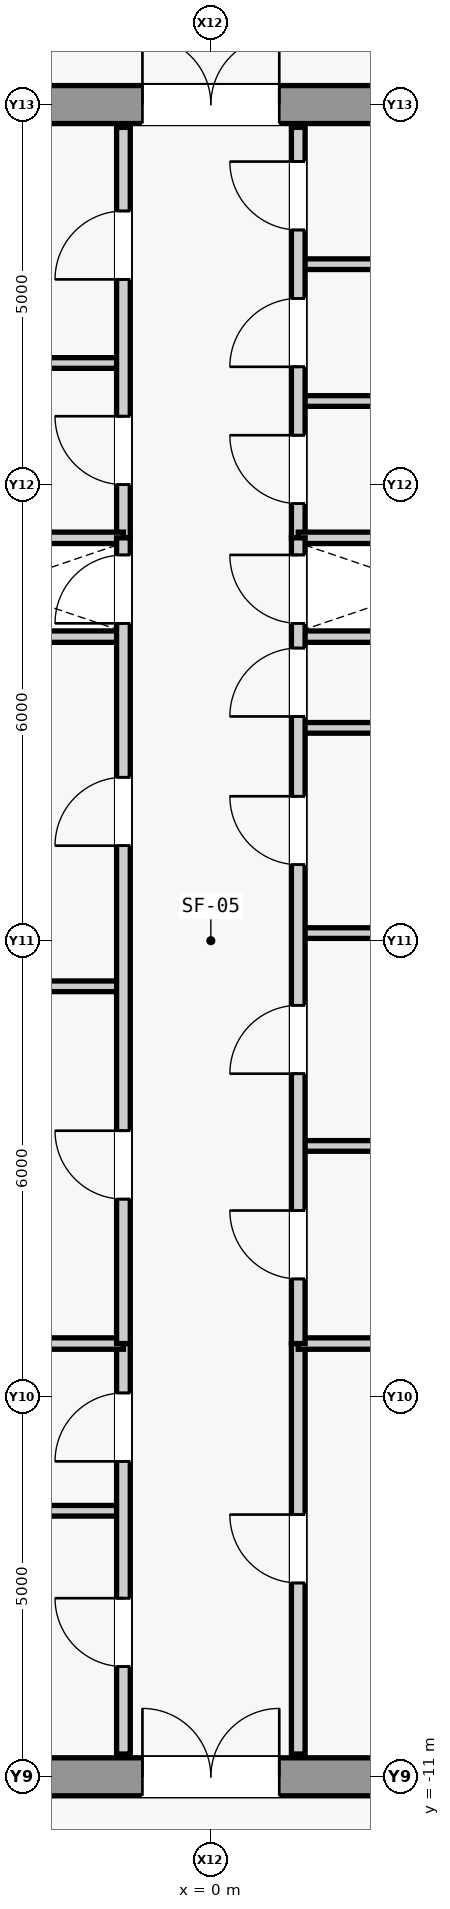
"""IFC4 building model, lengths in metres.
Left out: names, types, materials, properties, quantities, classifications, styles, units other than length and angle.
Written with IfcOpenShell. Run it as: python <this file> out.ifc"""

import sys

from ifc_helpers import new_model, si_unit, direction, frame, frame_2d, origin, place, context, subcontext, project, spatial, rectangle, extrude, source, transform, mapped, element, fill, save


model = new_model("IFC4")
c1 = context("Model", 3, precision=1e-05, world=origin(), true_north=direction((0.0, 1.0)))
c2 = subcontext(c1, "Body", "Model", "MODEL_VIEW")
j1 = project(units=[si_unit("LENGTHUNIT", "METRE"), si_unit("PLANEANGLEUNIT", "RADIAN")], contexts=[c1])
p1 = place(None, origin())
s1 = spatial("IfcSite", under=j1, at=p1, CompositionType="ELEMENT")
p2 = place(p1, origin())
s2 = spatial("IfcBuilding", under=s1, at=p2, CompositionType="ELEMENT")
p3 = place(p2, frame((0.0, 0.0, 399.5)))
s3 = spatial("IfcBuildingStorey", under=s2, at=p3, CompositionType="ELEMENT", Elevation=399.5)
m1 = source(origin(), c2, "Body", "SweptSolid", [
    extrude(rectangle(XDim=9.2, YDim=0.5, at=frame_2d((4.6, 0.0))), origin(), (0.0, 0.0, 1.0), 4.5),
])
p4 = place(p3, frame((-4.6, -11.0, 0.0), z_axis=(0.0, 0.0, 1.0), x_axis=(1.0, 0.0, 0.0)))
e1 = element("IfcWall", 1, at=p4, inside=s3, PredefinedType="SHEAR", context=c2, shape_type="MappedRepresentation", body=[
    mapped(m1, transform((0.0, 0.0, 0.0), scale=1.0)),
])
m2 = source(origin(), c2, "Body", "SweptSolid", [
    extrude(rectangle(XDim=1.8, YDim=2.25, at=frame_2d((0.9, 1.125))), frame((0.0, 0.26, 0.0), z_axis=(0.0, -1.0, 0.0), x_axis=(1.0, 0.0, 0.0)), (0.0, 0.0, 1.0), 0.52),
])
p5 = place(p4, frame((3.7, 0.0, 0.0)))
e2 = element("IfcOpeningElement", 2, at=p5, cuts=e1, PredefinedType="OPENING", context=c2, shape_type="MappedRepresentation", body=[
    mapped(m2, transform((0.0, 0.0, 0.0), scale=1.0)),
])
p6 = place(p3, frame((-4.6, 11.0, 0.0), z_axis=(0.0, 0.0, 1.0), x_axis=(1.0, 0.0, 0.0)))
e3 = element("IfcWall", 3, at=p6, inside=s3, PredefinedType="SHEAR", context=c2, shape_type="MappedRepresentation", body=[
    mapped(m1, transform((0.0, 0.0, 0.0), scale=1.0)),
])
p7 = place(p6, frame((3.7, 0.0, 0.0)))
e4 = element("IfcOpeningElement", 4, at=p7, cuts=e3, PredefinedType="OPENING", context=c2, shape_type="MappedRepresentation", body=[
    mapped(m2, transform((0.0, 0.0, 0.0), scale=1.0)),
])
m3 = source(origin(), c2, "Body", "SweptSolid", [
    extrude(rectangle(XDim=3.45, YDim=0.15, at=frame_2d((1.725, 0.0))), origin(), (0.0, 0.0, 1.0), 4.5),
])
for number, where, z_axis, x_axis in (
    (5, (-4.6, 4.0, 0.0), (0.0, 0.0, 1.0), (1.0, 0.0, 0.0)),
    (6, (1.15, 4.0, 0.0), (0.0, 0.0, 1.0), (1.0, 0.0, 0.0)),
):
    element("IfcWall", number, at=place(p3, frame(where, z_axis=z_axis, x_axis=x_axis)), inside=s3, PredefinedType="PARTITIONING", context=c2, shape_type="MappedRepresentation", body=[
        mapped(m3, transform((0.0, 0.0, 0.0), scale=1.0)),
    ])
m4 = source(origin(), c2, "Body", "SweptSolid", [
    extrude(rectangle(XDim=3.45, YDim=0.14, at=frame_2d((1.725, 0.0))), origin(), (0.0, 0.0, 1.0), 4.5),
])
p8 = place(p3, frame((-4.6, -7.5, 0.0), z_axis=(0.0, 0.0, 1.0), x_axis=(1.0, 0.0, 0.0)))
e7 = element("IfcWall", 7, at=p8, inside=s3, PredefinedType="PARTITIONING", context=c2, shape_type="MappedRepresentation", body=[
    mapped(m4, transform((0.0, 0.0, 0.0), scale=1.0)),
])
m5 = source(origin(), c2, "Body", "SweptSolid", [
    extrude(rectangle(XDim=5.4, YDim=0.18, at=frame_2d((2.7, 0.0))), origin(), (0.0, 0.0, 1.0), 4.5),
])
p9 = place(p3, frame((-1.15, -10.7, 0.0), z_axis=(0.0, 0.0, 1.0), x_axis=(0.0, 1.0, 0.0)))
e8 = element("IfcWall", 8, at=p9, inside=s3, PredefinedType="PARTITIONING", context=c2, shape_type="MappedRepresentation", body=[
    mapped(m5, transform((0.0, 0.0, 0.0), scale=1.0)),
])
m6 = source(origin(), c2, "Body", "SweptSolid", [
    extrude(rectangle(XDim=0.9, YDim=2.15, at=frame_2d((0.45, 1.075))), frame((0.0, 0.1, 0.0), z_axis=(0.0, -1.0, 0.0), x_axis=(1.0, 0.0, 0.0)), (0.0, 0.0, 1.0), 0.2),
])
p10 = place(p9, frame((1.15, 0.0, 0.0)))
e9 = element("IfcOpeningElement", 9, at=p10, cuts=e8, PredefinedType="OPENING", context=c2, shape_type="MappedRepresentation", body=[
    mapped(m6, transform((0.0, 0.0, 0.0), scale=1.0)),
])
p11 = place(p9, frame((3.85, 0.0, 0.0)))
e10 = element("IfcOpeningElement", 10, at=p11, cuts=e8, PredefinedType="OPENING", context=c2, shape_type="MappedRepresentation", body=[
    mapped(m6, transform((0.0, 0.0, 0.0), scale=1.0)),
])
p12 = place(p3, frame((1.15, -10.7, 0.0), z_axis=(0.0, 0.0, 1.0), x_axis=(0.0, 1.0, 0.0)))
e11 = element("IfcWall", 11, at=p12, inside=s3, PredefinedType="PARTITIONING", context=c2, shape_type="MappedRepresentation", body=[
    mapped(m5, transform((0.0, 0.0, 0.0), scale=1.0)),
])
p13 = place(p12, frame((2.25, 0.0, 0.0)))
e12 = element("IfcOpeningElement", 12, at=p13, cuts=e11, PredefinedType="OPENING", context=c2, shape_type="MappedRepresentation", body=[
    mapped(m6, transform((0.0, 0.0, 0.0), scale=1.0)),
])
for number, where, z_axis, x_axis in (
    (13, (-4.6, -5.3, 0.0), (0.0, 0.0, 1.0), (1.0, 0.0, 0.0)),
    (14, (1.15, -5.3, 0.0), (0.0, 0.0, 1.0), (1.0, 0.0, 0.0)),
):
    element("IfcWall", number, at=place(p3, frame(where, z_axis=z_axis, x_axis=x_axis)), inside=s3, PredefinedType="PARTITIONING", context=c2, shape_type="MappedRepresentation", body=[
        mapped(m3, transform((0.0, 0.0, 0.0), scale=1.0)),
    ])
p14 = place(p3, frame((-4.6, 7.6, 0.0), z_axis=(0.0, 0.0, 1.0), x_axis=(1.0, 0.0, 0.0)))
e15 = element("IfcWall", 15, at=p14, inside=s3, PredefinedType="PARTITIONING", context=c2, shape_type="MappedRepresentation", body=[
    mapped(m4, transform((0.0, 0.0, 0.0), scale=1.0)),
])
p15 = place(p3, frame((-1.15, 5.3, 0.0), z_axis=(0.0, 0.0, 1.0), x_axis=(0.0, 1.0, 0.0)))
e16 = element("IfcWall", 16, at=p15, inside=s3, PredefinedType="PARTITIONING", context=c2, shape_type="MappedRepresentation", body=[
    mapped(m5, transform((0.0, 0.0, 0.0), scale=1.0)),
])
p16 = place(p15, frame((0.7, 0.0, 0.0)))
e17 = element("IfcOpeningElement", 17, at=p16, cuts=e16, PredefinedType="OPENING", context=c2, shape_type="MappedRepresentation", body=[
    mapped(m6, transform((0.0, 0.0, 0.0), scale=1.0)),
])
p17 = place(p15, frame((3.4, 0.0, 0.0)))
e18 = element("IfcOpeningElement", 18, at=p17, cuts=e16, PredefinedType="OPENING", context=c2, shape_type="MappedRepresentation", body=[
    mapped(m6, transform((0.0, 0.0, 0.0), scale=1.0)),
])
for number, where, z_axis, x_axis in (
    (19, (1.15, 7.1, 0.0), (0.0, 0.0, 1.0), (1.0, 0.0, 0.0)),
    (20, (1.15, 8.9, 0.0), (0.0, 0.0, 1.0), (1.0, 0.0, 0.0)),
):
    element("IfcWall", number, at=place(p3, frame(where, z_axis=z_axis, x_axis=x_axis)), inside=s3, PredefinedType="PARTITIONING", context=c2, shape_type="MappedRepresentation", body=[
        mapped(m4, transform((0.0, 0.0, 0.0), scale=1.0)),
    ])
p18 = place(p3, frame((1.15, 5.3, 0.0), z_axis=(0.0, 0.0, 1.0), x_axis=(0.0, 1.0, 0.0)))
e21 = element("IfcWall", 21, at=p18, inside=s3, PredefinedType="PARTITIONING", context=c2, shape_type="MappedRepresentation", body=[
    mapped(m5, transform((0.0, 0.0, 0.0), scale=1.0)),
])
p19 = place(p18, frame((0.45, 0.0, 0.0)))
e22 = element("IfcOpeningElement", 22, at=p19, cuts=e21, PredefinedType="OPENING", context=c2, shape_type="MappedRepresentation", body=[
    mapped(m6, transform((0.0, 0.0, 0.0), scale=1.0)),
])
p20 = place(p18, frame((2.25, 0.0, 0.0)))
e23 = element("IfcOpeningElement", 23, at=p20, cuts=e21, PredefinedType="OPENING", context=c2, shape_type="MappedRepresentation", body=[
    mapped(m6, transform((0.0, 0.0, 0.0), scale=1.0)),
])
p21 = place(p18, frame((4.05, 0.0, 0.0)))
e24 = element("IfcOpeningElement", 24, at=p21, cuts=e21, PredefinedType="OPENING", context=c2, shape_type="MappedRepresentation", body=[
    mapped(m6, transform((0.0, 0.0, 0.0), scale=1.0)),
])
for number, where, z_axis, x_axis in (
    (25, (-4.6, 5.3, 0.0), (0.0, 0.0, 1.0), (1.0, 0.0, 0.0)),
    (26, (1.15, 5.3, 0.0), (0.0, 0.0, 1.0), (1.0, 0.0, 0.0)),
):
    element("IfcWall", number, at=place(p3, frame(where, z_axis=z_axis, x_axis=x_axis)), inside=s3, PredefinedType="PARTITIONING", context=c2, shape_type="MappedRepresentation", body=[
        mapped(m3, transform((0.0, 0.0, 0.0), scale=1.0)),
    ])
p22 = place(p3, frame((-4.6, -0.6, 0.0), z_axis=(0.0, 0.0, 1.0), x_axis=(1.0, 0.0, 0.0)))
e27 = element("IfcWall", 27, at=p22, inside=s3, PredefinedType="PARTITIONING", context=c2, shape_type="MappedRepresentation", body=[
    mapped(m4, transform((0.0, 0.0, 0.0), scale=1.0)),
])
m7 = source(origin(), c2, "Body", "SweptSolid", [
    extrude(rectangle(XDim=10.6, YDim=0.18, at=frame_2d((5.3, 0.0))), origin(), (0.0, 0.0, 1.0), 4.5),
])
p23 = place(p3, frame((-1.15, -5.3, 0.0), z_axis=(0.0, 0.0, 1.0), x_axis=(0.0, 1.0, 0.0)))
e28 = element("IfcWall", 28, at=p23, inside=s3, PredefinedType="PARTITIONING", context=c2, shape_type="MappedRepresentation", body=[
    mapped(m7, transform((0.0, 0.0, 0.0), scale=1.0)),
])
p24 = place(p23, frame((1.9, 0.0, 0.0)))
e29 = element("IfcOpeningElement", 29, at=p24, cuts=e28, PredefinedType="OPENING", context=c2, shape_type="MappedRepresentation", body=[
    mapped(m6, transform((0.0, 0.0, 0.0), scale=1.0)),
])
p25 = place(p23, frame((6.55, 0.0, 0.0)))
e30 = element("IfcOpeningElement", 30, at=p25, cuts=e28, PredefinedType="OPENING", context=c2, shape_type="MappedRepresentation", body=[
    mapped(m6, transform((0.0, 0.0, 0.0), scale=1.0)),
])
p26 = place(p23, frame((9.475, 0.0, 0.0)))
e31 = element("IfcOpeningElement", 31, at=p26, cuts=e28, PredefinedType="OPENING", context=c2, shape_type="MappedRepresentation", body=[
    mapped(m6, transform((0.0, 0.0, 0.0), scale=1.0)),
])
p27 = place(p3, frame((1.15, -2.7, 0.0), z_axis=(0.0, 0.0, 1.0), x_axis=(1.0, 0.0, 0.0)))
e32 = element("IfcWall", 32, at=p27, inside=s3, PredefinedType="PARTITIONING", context=c2, shape_type="MappedRepresentation", body=[
    mapped(m4, transform((0.0, 0.0, 0.0), scale=1.0)),
])
m8 = source(origin(), c2, "Body", "SweptSolid", [
    extrude(rectangle(XDim=3.45, YDim=0.14, at=frame_2d((1.725, 0.0))), origin(), (0.0, 0.0, 1.0), 3.805),
])
p28 = place(p3, frame((1.15, 0.1, 0.0), z_axis=(0.0, 0.0, 1.0), x_axis=(1.0, 0.0, 0.0)))
e33 = element("IfcWall", 33, at=p28, inside=s3, PredefinedType="PARTITIONING", context=c2, shape_type="MappedRepresentation", body=[
    mapped(m8, transform((0.0, 0.0, 0.0), scale=1.0)),
])
p29 = place(p3, frame((1.15, 2.8, 0.0), z_axis=(0.0, 0.0, 1.0), x_axis=(1.0, 0.0, 0.0)))
e34 = element("IfcWall", 34, at=p29, inside=s3, PredefinedType="PARTITIONING", context=c2, shape_type="MappedRepresentation", body=[
    mapped(m4, transform((0.0, 0.0, 0.0), scale=1.0)),
])
p30 = place(p3, frame((1.15, -5.3, 0.0), z_axis=(0.0, 0.0, 1.0), x_axis=(0.0, 1.0, 0.0)))
e35 = element("IfcWall", 35, at=p30, inside=s3, PredefinedType="PARTITIONING", context=c2, shape_type="MappedRepresentation", body=[
    mapped(m7, transform((0.0, 0.0, 0.0), scale=1.0)),
])
p31 = place(p30, frame((0.85, 0.0, 0.0)))
e36 = element("IfcOpeningElement", 36, at=p31, cuts=e35, PredefinedType="OPENING", context=c2, shape_type="MappedRepresentation", body=[
    mapped(m6, transform((0.0, 0.0, 0.0), scale=1.0)),
])
p32 = place(p30, frame((3.55, 0.0, 0.0)))
e37 = element("IfcOpeningElement", 37, at=p32, cuts=e35, PredefinedType="OPENING", context=c2, shape_type="MappedRepresentation", body=[
    mapped(m6, transform((0.0, 0.0, 0.0), scale=1.0)),
])
p33 = place(p30, frame((6.3, 0.0, 0.0)))
e38 = element("IfcOpeningElement", 38, at=p33, cuts=e35, PredefinedType="OPENING", context=c2, shape_type="MappedRepresentation", body=[
    mapped(m6, transform((0.0, 0.0, 0.0), scale=1.0)),
])
p34 = place(p30, frame((8.25, 0.0, 0.0)))
e39 = element("IfcOpeningElement", 39, at=p34, cuts=e35, PredefinedType="OPENING", context=c2, shape_type="MappedRepresentation", body=[
    mapped(m6, transform((0.0, 0.0, 0.0), scale=1.0)),
])
p35 = place(p30, frame((9.475, 0.0, 0.0)))
e40 = element("IfcOpeningElement", 40, at=p35, cuts=e35, PredefinedType="OPENING", context=c2, shape_type="MappedRepresentation", body=[
    mapped(m6, transform((0.0, 0.0, 0.0), scale=1.0)),
])
m9 = source(origin(), c2, "Body", "SweptSolid", [
    extrude(rectangle(XDim=0.9, YDim=2.15, at=frame_2d((0.45, 1.075))), frame((0.0, 0.025, 0.0), z_axis=(0.0, -1.0, 0.0), x_axis=(1.0, 0.0, 0.0)), (0.0, 0.0, 1.0), 0.05),
])
p36 = place(p10, origin())
e41 = element("IfcDoor", 41, at=p36, inside=s3, OperationType="SINGLE_SWING_RIGHT", PredefinedType="DOOR", context=c2, shape_type="MappedRepresentation", body=[
    mapped(m9, transform((0.0, 0.0, 0.0), scale=1.0)),
])
fill(e9, e41)
p37 = place(p11, origin())
e42 = element("IfcDoor", 42, at=p37, inside=s3, OperationType="SINGLE_SWING_LEFT", PredefinedType="DOOR", context=c2, shape_type="MappedRepresentation", body=[
    mapped(m9, transform((0.0, 0.0, 0.0), scale=1.0)),
])
fill(e10, e42)
p38 = place(p13, origin())
e43 = element("IfcDoor", 43, at=p38, inside=s3, OperationType="SINGLE_SWING_RIGHT", PredefinedType="DOOR", context=c2, shape_type="MappedRepresentation", body=[
    mapped(m9, transform((0.0, 0.0, 0.0), scale=1.0)),
])
fill(e12, e43)
m10 = source(origin(), c2, "Body", "SweptSolid", [
    extrude(rectangle(XDim=1.8, YDim=2.25, at=frame_2d((0.9, 1.125))), frame((0.0, 0.025, 0.0), z_axis=(0.0, -1.0, 0.0), x_axis=(1.0, 0.0, 0.0)), (0.0, 0.0, 1.0), 0.05),
])
p39 = place(p5, origin())
e44 = element("IfcDoor", 44, at=p39, inside=s3, OperationType="SINGLE_SWING_LEFT", PredefinedType="DOOR", context=c2, shape_type="MappedRepresentation", body=[
    mapped(m10, transform((0.0, 0.0, 0.0), scale=1.0)),
])
fill(e2, e44)
p40 = place(p16, origin())
e45 = element("IfcDoor", 45, at=p40, inside=s3, OperationType="SINGLE_SWING_RIGHT", PredefinedType="DOOR", context=c2, shape_type="MappedRepresentation", body=[
    mapped(m9, transform((0.0, 0.0, 0.0), scale=1.0)),
])
fill(e17, e45)
p41 = place(p17, origin())
e46 = element("IfcDoor", 46, at=p41, inside=s3, OperationType="SINGLE_SWING_LEFT", PredefinedType="DOOR", context=c2, shape_type="MappedRepresentation", body=[
    mapped(m9, transform((0.0, 0.0, 0.0), scale=1.0)),
])
fill(e18, e46)
p42 = place(p19, origin())
e47 = element("IfcDoor", 47, at=p42, inside=s3, OperationType="SINGLE_SWING_RIGHT", PredefinedType="DOOR", context=c2, shape_type="MappedRepresentation", body=[
    mapped(m9, transform((0.0, 0.0, 0.0), scale=1.0)),
])
fill(e22, e47)
p43 = place(p20, origin())
e48 = element("IfcDoor", 48, at=p43, inside=s3, OperationType="SINGLE_SWING_LEFT", PredefinedType="DOOR", context=c2, shape_type="MappedRepresentation", body=[
    mapped(m9, transform((0.0, 0.0, 0.0), scale=1.0)),
])
fill(e23, e48)
p44 = place(p21, origin())
e49 = element("IfcDoor", 49, at=p44, inside=s3, OperationType="SINGLE_SWING_RIGHT", PredefinedType="DOOR", context=c2, shape_type="MappedRepresentation", body=[
    mapped(m9, transform((0.0, 0.0, 0.0), scale=1.0)),
])
fill(e24, e49)
p45 = place(p7, origin())
e50 = element("IfcDoor", 50, at=p45, inside=s3, OperationType="SINGLE_SWING_RIGHT", PredefinedType="DOOR", context=c2, shape_type="MappedRepresentation", body=[
    mapped(m10, transform((0.0, 0.0, 0.0), scale=1.0)),
])
fill(e4, e50)
p46 = place(p24, origin())
e51 = element("IfcDoor", 51, at=p46, inside=s3, OperationType="SINGLE_SWING_RIGHT", PredefinedType="DOOR", context=c2, shape_type="MappedRepresentation", body=[
    mapped(m9, transform((0.0, 0.0, 0.0), scale=1.0)),
])
fill(e29, e51)
p47 = place(p25, origin())
e52 = element("IfcDoor", 52, at=p47, inside=s3, OperationType="SINGLE_SWING_LEFT", PredefinedType="DOOR", context=c2, shape_type="MappedRepresentation", body=[
    mapped(m9, transform((0.0, 0.0, 0.0), scale=1.0)),
])
fill(e30, e52)
p48 = place(p31, origin())
e53 = element("IfcDoor", 53, at=p48, inside=s3, OperationType="SINGLE_SWING_RIGHT", PredefinedType="DOOR", context=c2, shape_type="MappedRepresentation", body=[
    mapped(m9, transform((0.0, 0.0, 0.0), scale=1.0)),
])
fill(e36, e53)
p49 = place(p32, origin())
e54 = element("IfcDoor", 54, at=p49, inside=s3, OperationType="SINGLE_SWING_LEFT", PredefinedType="DOOR", context=c2, shape_type="MappedRepresentation", body=[
    mapped(m9, transform((0.0, 0.0, 0.0), scale=1.0)),
])
fill(e37, e54)
p50 = place(p33, origin())
e55 = element("IfcDoor", 55, at=p50, inside=s3, OperationType="SINGLE_SWING_RIGHT", PredefinedType="DOOR", context=c2, shape_type="MappedRepresentation", body=[
    mapped(m9, transform((0.0, 0.0, 0.0), scale=1.0)),
])
fill(e38, e55)
p51 = place(p34, origin())
e56 = element("IfcDoor", 56, at=p51, inside=s3, OperationType="SINGLE_SWING_LEFT", PredefinedType="DOOR", context=c2, shape_type="MappedRepresentation", body=[
    mapped(m9, transform((0.0, 0.0, 0.0), scale=1.0)),
])
fill(e39, e56)
p52 = place(p26, origin())
e57 = element("IfcDoor", 57, at=p52, inside=s3, OperationType="SINGLE_SWING_LEFT", PredefinedType="DOOR", context=c2, shape_type="MappedRepresentation", body=[
    mapped(m9, transform((0.0, 0.0, 0.0), scale=1.0)),
])
fill(e31, e57)
p53 = place(p35, origin())
e58 = element("IfcDoor", 58, at=p53, inside=s3, OperationType="SINGLE_SWING_RIGHT", PredefinedType="DOOR", context=c2, shape_type="MappedRepresentation", body=[
    mapped(m9, transform((0.0, 0.0, 0.0), scale=1.0)),
])
fill(e40, e58)
save(model, sys.argv[1])
